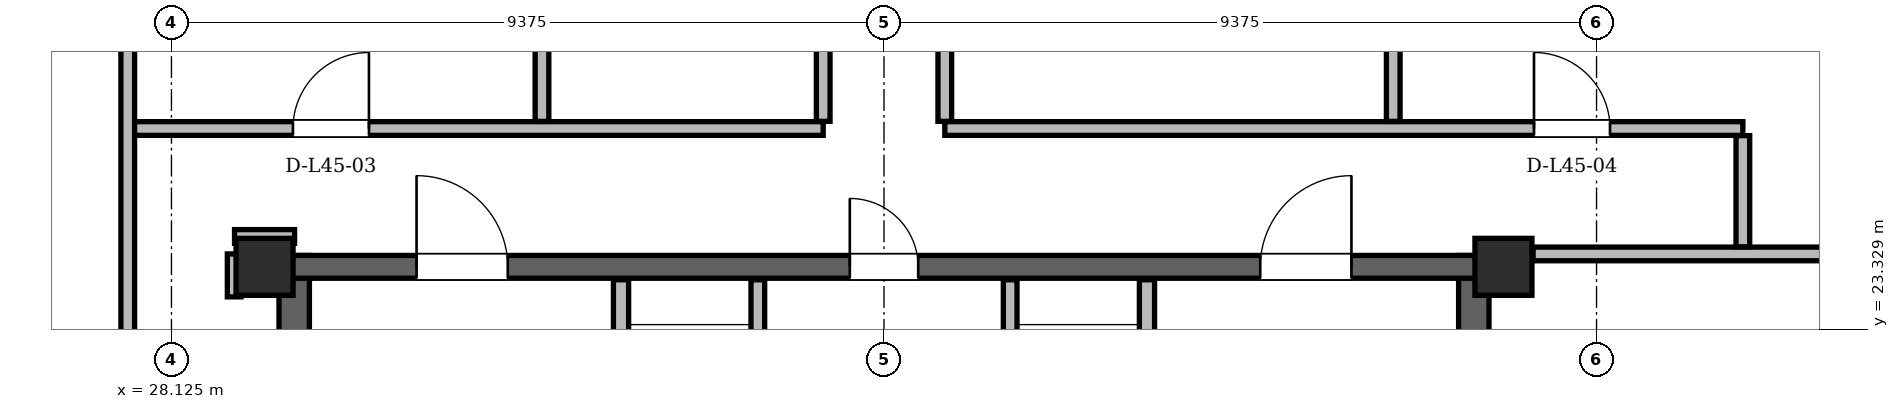
"""IFC4 building model, lengths in metres.
Left out: names, types, materials, properties, quantities, classifications, styles, units other than length and angle.
Written with IfcOpenShell. Run it as: python <this file> out.ifc"""

import sys

from ifc_helpers import new_model, si_unit, direction, frame, frame_2d, origin, origin_2d, place, context, subcontext, project, spatial, rectangle, hollow_rectangle, extrude, element, fill, save


model = new_model("IFC4")
c1 = context("Model", 3, precision=1e-05, world=origin(), true_north=direction((0.0, 1.0)))
c2 = subcontext(c1, "Body", "Model", "MODEL_VIEW")
j1 = project(units=[si_unit("LENGTHUNIT", "METRE"), si_unit("PLANEANGLEUNIT", "RADIAN")], contexts=[c1])
p1 = place(None, origin())
s1 = spatial("IfcSite", under=j1, at=p1, CompositionType="ELEMENT")
p2 = place(p1, origin())
s2 = spatial("IfcBuilding", under=s1, at=p2, CompositionType="ELEMENT")
p3 = place(p2, frame((0.0, 0.0, 171.0)))
s3 = spatial("IfcBuildingStorey", under=s2, at=p3, CompositionType="ELEMENT", Elevation=171.0)
for number, where, z_axis, x_axis in (
    (1, (45.65, 24.15, 0.0), (0.0, 0.0, 1.0), (1.0, 0.0, 0.0)),
    (2, (29.35, 24.15, 0.0), (0.0, 0.0, 1.0), (1.0, 0.0, 0.0)),
):
    element("IfcColumn", number, at=place(p3, frame(where, z_axis=z_axis, x_axis=x_axis)), inside=s3, PredefinedType="COLUMN", context=c2, shape_type="SweptSolid", body=[
        extrude(hollow_rectangle(XDim=0.75, YDim=0.75, WallThickness=0.06, at=origin_2d()), origin(), (0.0, 0.0, 1.0), 3.6),
    ])
for number, where, z_axis, x_axis in (
    (3, (29.74, 11.0, 0.0), (0.0, 0.0, 1.0), (0.0, 1.0, 0.0)),
    (4, (45.26, 11.0, 0.0), (0.0, 0.0, 1.0), (0.0, 1.0, 0.0)),
):
    element("IfcWall", number, at=place(p3, frame(where, z_axis=z_axis, x_axis=x_axis)), inside=s3, PredefinedType="SHEAR", context=c2, shape_type="SweptSolid", body=[
        extrude(rectangle(XDim=13.3, YDim=0.4, at=frame_2d((6.65, 0.0))), origin(), (0.0, 0.0, 1.0), 3.38),
    ])
p4 = place(p3, frame((29.65, 24.15, 0.0), z_axis=(0.0, 0.0, 1.0), x_axis=(1.0, 0.0, 0.0)))
e5 = element("IfcWall", 5, at=p4, inside=s3, PredefinedType="SHEAR", context=c2, shape_type="SweptSolid", body=[
    extrude(rectangle(XDim=15.7, YDim=0.3, at=frame_2d((7.85, 0.0))), origin(), (0.0, 0.0, 1.0), 3.38),
])
p5 = place(p4, frame((1.7, 0.0, 0.0)))
e6 = element("IfcOpeningElement", 6, at=p5, cuts=e5, PredefinedType="OPENING", context=c2, shape_type="SweptSolid", body=[
    extrude(rectangle(XDim=1.2, YDim=2.2, at=frame_2d((0.6, 1.1))), frame((0.0, 0.15, 0.0), z_axis=(0.0, -1.0, 0.0), x_axis=(1.0, 0.0, 0.0)), (0.0, 0.0, 1.0), 0.3),
])
p6 = place(p4, frame((12.8, 0.0, 0.0)))
e7 = element("IfcOpeningElement", 7, at=p6, cuts=e5, PredefinedType="OPENING", context=c2, shape_type="SweptSolid", body=[
    extrude(rectangle(XDim=1.2, YDim=2.2, at=frame_2d((0.6, 1.1))), frame((0.0, 0.15, 0.0), z_axis=(0.0, -1.0, 0.0), x_axis=(1.0, 0.0, 0.0)), (0.0, 0.0, 1.0), 0.3),
])
p7 = place(p4, frame((7.4, 0.0, 0.0)))
e8 = element("IfcOpeningElement", 8, at=p7, cuts=e5, PredefinedType="OPENING", context=c2, shape_type="SweptSolid", body=[
    extrude(rectangle(XDim=0.9, YDim=2.05, at=frame_2d((0.45, 1.025))), frame((0.0, 0.15, 0.0), z_axis=(0.0, -1.0, 0.0), x_axis=(1.0, 0.0, 0.0)), (0.0, 0.0, 1.0), 0.3),
])
p8 = place(p3, frame((59.708, 12.214, 0.0), z_axis=(0.0, 0.0, 1.0), x_axis=(-0.499997229411, 0.866027003379, 0.0)))
e9 = element("IfcWall", 9, at=p8, inside=s3, PredefinedType="SOLIDWALL", context=c2, shape_type="SweptSolid", body=[
    extrude(rectangle(XDim=35.866, YDim=0.29, at=frame_2d((17.933, 0.0))), origin(), (0.0, 0.0, 1.0), 2.6),
])
p9 = place(p8, frame((8.034, 0.0, 0.0)))
e10 = element("IfcOpeningElement", 10, at=p9, cuts=e9, PredefinedType="OPENING", context=c2, shape_type="SweptSolid", body=[
    extrude(rectangle(XDim=1.5, YDim=2.2, at=frame_2d((0.75, 1.1))), frame((0.0, 0.145, 0.0), z_axis=(0.0, -1.0, 0.0), x_axis=(1.0, 0.0, 0.0)), (0.0, 0.0, 1.0), 0.29),
])
p10 = place(p8, frame((27.787, 0.0, 0.0)))
e11 = element("IfcOpeningElement", 11, at=p10, cuts=e9, PredefinedType="OPENING", context=c2, shape_type="SweptSolid", body=[
    extrude(rectangle(XDim=1.5, YDim=2.2, at=frame_2d((0.75, 1.1))), frame((0.0, 0.145, 0.0), z_axis=(0.0, -1.0, 0.0), x_axis=(1.0, 0.0, 0.0)), (0.0, 0.0, 1.0), 0.29),
])
p11 = place(p8, frame((33.023, 0.0, 0.85)))
e12 = element("IfcOpeningElement", 12, at=p11, cuts=e9, PredefinedType="OPENING", context=c2, shape_type="SweptSolid", body=[
    extrude(rectangle(XDim=1.2, YDim=1.48, at=frame_2d((0.6, 0.74))), frame((0.0, 0.145, 0.0), z_axis=(0.0, -1.0, 0.0), x_axis=(1.0, 0.0, 0.0)), (0.0, 0.0, 1.0), 0.29),
])
p12 = place(p8, frame((15.917, 0.0, 0.85)))
e13 = element("IfcOpeningElement", 13, at=p12, cuts=e9, PredefinedType="OPENING", context=c2, shape_type="SweptSolid", body=[
    extrude(rectangle(XDim=1.4, YDim=1.6, at=frame_2d((0.7, 0.8))), frame((0.0, 0.145, 0.0), z_axis=(0.0, -1.0, 0.0), x_axis=(1.0, 0.0, 0.0)), (0.0, 0.0, 1.0), 0.29),
])
p13 = place(p8, frame((21.416, 0.0, 0.85)))
e14 = element("IfcOpeningElement", 14, at=p13, cuts=e9, PredefinedType="OPENING", context=c2, shape_type="SweptSolid", body=[
    extrude(rectangle(XDim=2.5, YDim=1.64, at=frame_2d((1.25, 0.82))), frame((0.0, 0.145, 0.0), z_axis=(0.0, -1.0, 0.0), x_axis=(1.0, 0.0, 0.0)), (0.0, 0.0, 1.0), 0.29),
])
p14 = place(p3, frame((33.226, 43.275, 0.0), z_axis=(0.0, 0.0, 1.0), x_axis=(-0.499997229411, -0.866027003379, 0.0)))
e15 = element("IfcWall", 15, at=p14, inside=s3, PredefinedType="SOLIDWALL", context=c2, shape_type="SweptSolid", body=[
    extrude(rectangle(XDim=35.866, YDim=0.29, at=frame_2d((17.933, 0.0))), origin(), (0.0, 0.0, 1.0), 2.6),
])
p15 = place(p14, frame((8.034, 0.0, 0.0)))
e16 = element("IfcOpeningElement", 16, at=p15, cuts=e15, PredefinedType="OPENING", context=c2, shape_type="SweptSolid", body=[
    extrude(rectangle(XDim=1.5, YDim=2.2, at=frame_2d((0.75, 1.1))), frame((0.0, 0.145, 0.0), z_axis=(0.0, -1.0, 0.0), x_axis=(1.0, 0.0, 0.0)), (0.0, 0.0, 1.0), 0.29),
])
p16 = place(p14, frame((27.787, 0.0, 0.0)))
e17 = element("IfcOpeningElement", 17, at=p16, cuts=e15, PredefinedType="OPENING", context=c2, shape_type="SweptSolid", body=[
    extrude(rectangle(XDim=1.5, YDim=2.2, at=frame_2d((0.75, 1.1))), frame((0.0, 0.145, 0.0), z_axis=(0.0, -1.0, 0.0), x_axis=(1.0, 0.0, 0.0)), (0.0, 0.0, 1.0), 0.29),
])
p17 = place(p14, frame((33.63, 0.0, 0.85)))
e18 = element("IfcOpeningElement", 18, at=p17, cuts=e15, PredefinedType="OPENING", context=c2, shape_type="SweptSolid", body=[
    extrude(rectangle(XDim=1.2, YDim=1.48, at=frame_2d((0.6, 0.74))), frame((0.0, 0.145, 0.0), z_axis=(0.0, -1.0, 0.0), x_axis=(1.0, 0.0, 0.0)), (0.0, 0.0, 1.0), 0.29),
])
p18 = place(p14, frame((18.03, 0.0, 0.85)))
e19 = element("IfcOpeningElement", 19, at=p18, cuts=e15, PredefinedType="OPENING", context=c2, shape_type="SweptSolid", body=[
    extrude(rectangle(XDim=2.6, YDim=1.64, at=frame_2d((1.3, 0.82))), frame((0.0, 0.145, 0.0), z_axis=(0.0, -1.0, 0.0), x_axis=(1.0, 0.0, 0.0)), (0.0, 0.0, 1.0), 0.29),
])
p19 = place(p14, frame((26.121, 0.0, 0.85)))
e20 = element("IfcOpeningElement", 20, at=p19, cuts=e15, PredefinedType="OPENING", context=c2, shape_type="SweptSolid", body=[
    extrude(rectangle(XDim=1.2, YDim=1.48, at=frame_2d((0.6, 0.74))), frame((0.0, 0.145, 0.0), z_axis=(0.0, -1.0, 0.0), x_axis=(1.0, 0.0, 0.0)), (0.0, 0.0, 1.0), 0.29),
])
p20 = place(p14, frame((12.379, 0.0, 0.85)))
e21 = element("IfcOpeningElement", 21, at=p20, cuts=e15, PredefinedType="OPENING", context=c2, shape_type="SweptSolid", body=[
    extrude(rectangle(XDim=1.2, YDim=1.48, at=frame_2d((0.6, 0.74))), frame((0.0, 0.145, 0.0), z_axis=(0.0, -1.0, 0.0), x_axis=(1.0, 0.0, 0.0)), (0.0, 0.0, 1.0), 0.29),
])
p21 = place(p14, frame((14.675, 0.0, 0.85)))
e22 = element("IfcOpeningElement", 22, at=p21, cuts=e15, PredefinedType="OPENING", context=c2, shape_type="SweptSolid", body=[
    extrude(rectangle(XDim=1.8, YDim=1.64, at=frame_2d((0.9, 0.82))), frame((0.0, 0.145, 0.0), z_axis=(0.0, -1.0, 0.0), x_axis=(1.0, 0.0, 0.0)), (0.0, 0.0, 1.0), 0.29),
])
p22 = place(p14, frame((2.162, 0.0, 0.85)))
e23 = element("IfcOpeningElement", 23, at=p22, cuts=e15, PredefinedType="OPENING", context=c2, shape_type="SweptSolid", body=[
    extrude(rectangle(XDim=2.0, YDim=1.64, at=frame_2d((1.0, 0.82))), frame((0.0, 0.145, 0.0), z_axis=(0.0, -1.0, 0.0), x_axis=(1.0, 0.0, 0.0)), (0.0, 0.0, 1.0), 0.29),
])
p23 = place(p3, frame((34.04, 19.48, 0.0), z_axis=(0.0, 0.0, 1.0), x_axis=(0.0, 1.0, 0.0)))
e24 = element("IfcWall", 24, at=p23, inside=s3, PredefinedType="PARTITIONING", context=c2, shape_type="SweptSolid", body=[
    extrude(rectangle(XDim=4.5, YDim=0.2, at=frame_2d((2.25, 0.0))), origin(), (0.0, 0.0, 1.0), 3.38),
])
p24 = place(p23, frame((2.12, 0.0, 0.0)))
e25 = element("IfcOpeningElement", 25, at=p24, cuts=e24, PredefinedType="OPENING", context=c2, shape_type="SweptSolid", body=[
    extrude(rectangle(XDim=1.1, YDim=2.2, at=frame_2d((0.55, 1.1))), frame((0.0, 0.1, 0.0), z_axis=(0.0, -1.0, 0.0), x_axis=(1.0, 0.0, 0.0)), (0.0, 0.0, 1.0), 0.2),
])
p25 = place(p3, frame((35.84, 20.96, 0.0), z_axis=(0.0, 0.0, 1.0), x_axis=(0.0, 1.0, 0.0)))
e26 = element("IfcWall", 26, at=p25, inside=s3, PredefinedType="PARTITIONING", context=c2, shape_type="SweptSolid", body=[
    extrude(rectangle(XDim=3.02, YDim=0.18, at=frame_2d((1.51, 0.0))), origin(), (0.0, 0.0, 1.0), 3.38),
])
p26 = place(p3, frame((40.96, 19.48, 0.0), z_axis=(0.0, 0.0, 1.0), x_axis=(0.0, 1.0, 0.0)))
e27 = element("IfcWall", 27, at=p26, inside=s3, PredefinedType="PARTITIONING", context=c2, shape_type="SweptSolid", body=[
    extrude(rectangle(XDim=4.5, YDim=0.2, at=frame_2d((2.25, 0.0))), origin(), (0.0, 0.0, 1.0), 3.38),
])
p27 = place(p26, frame((2.12, 0.0, 0.0)))
e28 = element("IfcOpeningElement", 28, at=p27, cuts=e27, PredefinedType="OPENING", context=c2, shape_type="SweptSolid", body=[
    extrude(rectangle(XDim=1.1, YDim=2.2, at=frame_2d((0.55, 1.1))), frame((0.0, 0.1, 0.0), z_axis=(0.0, -1.0, 0.0), x_axis=(1.0, 0.0, 0.0)), (0.0, 0.0, 1.0), 0.2),
])
p28 = place(p3, frame((39.16, 20.96, 0.0), z_axis=(0.0, 0.0, 1.0), x_axis=(0.0, 1.0, 0.0)))
e29 = element("IfcWall", 29, at=p28, inside=s3, PredefinedType="PARTITIONING", context=c2, shape_type="SweptSolid", body=[
    extrude(rectangle(XDim=3.02, YDim=0.18, at=frame_2d((1.51, 0.0))), origin(), (0.0, 0.0, 1.0), 3.38),
])
p29 = place(p3, frame((46.04, 24.32, 0.0), z_axis=(0.0, 0.0, 1.0), x_axis=(1.0, 0.0, 0.0)))
e30 = element("IfcWall", 30, at=p29, inside=s3, PredefinedType="PARTITIONING", context=c2, shape_type="SweptSolid", body=[
    extrude(rectangle(XDim=6.506, YDim=0.18, at=frame_2d((3.253, 0.0))), origin(), (0.0, 0.0, 1.0), 3.38),
])
p30 = place(p3, frame((28.955, 24.55, 0.0), z_axis=(0.0, 0.0, 1.0), x_axis=(1.0, 0.0, 0.0)))
e31 = element("IfcWall", 31, at=p30, inside=s3, PredefinedType="PARTITIONING", context=c2, shape_type="SweptSolid", body=[
    extrude(rectangle(XDim=0.79, YDim=0.18, at=frame_2d((0.395, 0.0))), origin(), (0.0, 0.0, 1.0), 2.842),
])
p31 = place(p3, frame((27.55, 25.97, 0.0), z_axis=(0.0, 0.0, 1.0), x_axis=(1.0, 0.0, 0.0)))
e32 = element("IfcWall", 32, at=p31, inside=s3, PredefinedType="PARTITIONING", context=c2, shape_type="SweptSolid", body=[
    extrude(rectangle(XDim=9.15, YDim=0.18, at=frame_2d((4.575, 0.0))), origin(), (0.0, 0.0, 1.0), 2.842),
])
p32 = place(p31, frame((2.173, 0.0, 0.0)))
e33 = element("IfcOpeningElement", 33, at=p32, cuts=e32, PredefinedType="OPENING", context=c2, shape_type="SweptSolid", body=[
    extrude(rectangle(XDim=1.0, YDim=2.18, at=frame_2d((0.5, 1.09))), frame((0.0, 0.09, 0.0), z_axis=(0.0, -1.0, 0.0), x_axis=(1.0, 0.0, 0.0)), (0.0, 0.0, 1.0), 0.18),
])
p33 = place(p3, frame((38.3, 25.97, 0.0), z_axis=(0.0, 0.0, 1.0), x_axis=(1.0, 0.0, 0.0)))
e34 = element("IfcWall", 34, at=p33, inside=s3, PredefinedType="PARTITIONING", context=c2, shape_type="SweptSolid", body=[
    extrude(rectangle(XDim=10.5, YDim=0.18, at=frame_2d((5.25, 0.0))), origin(), (0.0, 0.0, 1.0), 2.842),
])
p34 = place(p33, frame((7.752, 0.0, 0.0)))
e35 = element("IfcOpeningElement", 35, at=p34, cuts=e34, PredefinedType="OPENING", context=c2, shape_type="SweptSolid", body=[
    extrude(rectangle(XDim=1.0, YDim=2.18, at=frame_2d((0.5, 1.09))), frame((0.0, 0.09, 0.0), z_axis=(0.0, -1.0, 0.0), x_axis=(1.0, 0.0, 0.0)), (0.0, 0.0, 1.0), 0.18),
])
p35 = place(p3, frame((27.55, 18.544, 0.0), z_axis=(0.0, 0.0, 1.0), x_axis=(0.0, 1.0, 0.0)))
e36 = element("IfcWall", 36, at=p35, inside=s3, PredefinedType="PARTITIONING", context=c2, shape_type="SweptSolid", body=[
    extrude(rectangle(XDim=14.603, YDim=0.18, at=frame_2d((7.302, 0.0))), origin(), (0.0, 0.0, 1.0), 3.38),
])
p36 = place(p35, frame((2.267, 0.0, 0.0)))
e37 = element("IfcOpeningElement", 37, at=p36, cuts=e36, PredefinedType="OPENING", context=c2, shape_type="SweptSolid", body=[
    extrude(rectangle(XDim=1.0, YDim=2.18, at=frame_2d((0.5, 1.09))), frame((0.0, 0.09, 0.0), z_axis=(0.0, -1.0, 0.0), x_axis=(1.0, 0.0, 0.0)), (0.0, 0.0, 1.0), 0.18),
])
p37 = place(p3, frame((28.95, 23.755, 0.0), z_axis=(0.0, 0.0, 1.0), x_axis=(0.0, 1.0, 0.0)))
e38 = element("IfcWall", 38, at=p37, inside=s3, PredefinedType="PARTITIONING", context=c2, shape_type="SweptSolid", body=[
    extrude(rectangle(XDim=0.565, YDim=0.18, at=frame_2d((0.283, 0.0))), origin(), (0.0, 0.0, 1.0), 3.38),
])
p38 = place(p3, frame((33.0, 26.064, 0.0), z_axis=(0.0, 0.0, 1.0), x_axis=(0.0, 1.0, 0.0)))
e39 = element("IfcWall", 39, at=p38, inside=s3, PredefinedType="PARTITIONING", context=c2, shape_type="SweptSolid", body=[
    extrude(rectangle(XDim=16.522, YDim=0.18, at=frame_2d((8.261, 0.0))), origin(), (0.0, 0.0, 1.0), 2.842),
])
p39 = place(p3, frame((36.7, 26.064, 0.0), z_axis=(0.0, 0.0, 1.0), x_axis=(0.0, 1.0, 0.0)))
e40 = element("IfcWall", 40, at=p39, inside=s3, PredefinedType="PARTITIONING", context=c2, shape_type="SweptSolid", body=[
    extrude(rectangle(XDim=17.062, YDim=0.18, at=frame_2d((8.531, 0.0))), origin(), (0.0, 0.0, 1.0), 3.38),
])
p40 = place(p39, frame((4.902, 0.0, 0.0)))
e41 = element("IfcOpeningElement", 41, at=p40, cuts=e40, PredefinedType="OPENING", context=c2, shape_type="SweptSolid", body=[
    extrude(rectangle(XDim=1.0, YDim=2.18, at=frame_2d((0.5, 1.09))), frame((0.0, 0.09, 0.0), z_axis=(0.0, -1.0, 0.0), x_axis=(1.0, 0.0, 0.0)), (0.0, 0.0, 1.0), 0.18),
])
p41 = place(p3, frame((38.3, 26.064, 0.0), z_axis=(0.0, 0.0, 1.0), x_axis=(0.0, 1.0, 0.0)))
e42 = element("IfcWall", 42, at=p41, inside=s3, PredefinedType="PARTITIONING", context=c2, shape_type="SweptSolid", body=[
    extrude(rectangle(XDim=6.042, YDim=0.18, at=frame_2d((3.021, 0.0))), origin(), (0.0, 0.0, 1.0), 3.38),
])
p42 = place(p41, frame((4.455, 0.0, 0.0)))
e43 = element("IfcOpeningElement", 43, at=p42, cuts=e42, PredefinedType="OPENING", context=c2, shape_type="SweptSolid", body=[
    extrude(rectangle(XDim=1.0, YDim=2.18, at=frame_2d((0.5, 1.09))), frame((0.0, 0.09, 0.0), z_axis=(0.0, -1.0, 0.0), x_axis=(1.0, 0.0, 0.0)), (0.0, 0.0, 1.0), 0.18),
])
p43 = place(p3, frame((44.2, 26.064, 0.0), z_axis=(0.0, 0.0, 1.0), x_axis=(0.0, 1.0, 0.0)))
e44 = element("IfcWall", 44, at=p43, inside=s3, PredefinedType="PARTITIONING", context=c2, shape_type="SweptSolid", body=[
    extrude(rectangle(XDim=12.712, YDim=0.18, at=frame_2d((6.356, 0.0))), origin(), (0.0, 0.0, 1.0), 2.842),
])
p44 = place(p3, frame((48.8, 24.414, 0.0), z_axis=(0.0, 0.0, 1.0), x_axis=(0.0, 1.0, 0.0)))
e45 = element("IfcWall", 45, at=p44, inside=s3, PredefinedType="PARTITIONING", context=c2, shape_type="SweptSolid", body=[
    extrude(rectangle(XDim=1.462, YDim=0.18, at=frame_2d((0.731, 0.0))), origin(), (0.0, 0.0, 1.0), 3.38),
])
p45 = place(p5, origin())
e46 = element("IfcDoor", 46, at=p45, inside=s3, OperationType="SINGLE_SWING_LEFT", PredefinedType="DOOR", context=c2, shape_type="SweptSolid", body=[
    extrude(rectangle(XDim=1.2, YDim=2.2, at=frame_2d((0.6, 1.1))), frame((0.0, 0.025, 0.0), z_axis=(0.0, -1.0, 0.0), x_axis=(1.0, 0.0, 0.0)), (0.0, 0.0, 1.0), 0.05),
])
fill(e6, e46)
p46 = place(p6, origin())
e47 = element("IfcDoor", 47, at=p46, inside=s3, OperationType="SINGLE_SWING_RIGHT", PredefinedType="DOOR", context=c2, shape_type="SweptSolid", body=[
    extrude(rectangle(XDim=1.2, YDim=2.2, at=frame_2d((0.6, 1.1))), frame((0.0, 0.025, 0.0), z_axis=(0.0, -1.0, 0.0), x_axis=(1.0, 0.0, 0.0)), (0.0, 0.0, 1.0), 0.05),
])
fill(e7, e47)
p47 = place(p7, origin())
e48 = element("IfcDoor", 48, at=p47, inside=s3, OperationType="SINGLE_SWING_LEFT", PredefinedType="DOOR", context=c2, shape_type="SweptSolid", body=[
    extrude(rectangle(XDim=0.9, YDim=2.05, at=frame_2d((0.45, 1.025))), frame((0.0, 0.025, 0.0), z_axis=(0.0, -1.0, 0.0), x_axis=(1.0, 0.0, 0.0)), (0.0, 0.0, 1.0), 0.05),
])
fill(e8, e48)
p48 = place(p32, origin())
e49 = element("IfcDoor", 49, at=p48, inside=s3, OperationType="SINGLE_SWING_RIGHT", PredefinedType="DOOR", context=c2, shape_type="SweptSolid", body=[
    extrude(rectangle(XDim=1.0, YDim=2.18, at=frame_2d((0.5, 1.09))), frame((0.0, 0.025, 0.0), z_axis=(0.0, -1.0, 0.0), x_axis=(1.0, 0.0, 0.0)), (0.0, 0.0, 1.0), 0.05),
])
fill(e33, e49)
p49 = place(p34, origin())
e50 = element("IfcDoor", 50, at=p49, inside=s3, OperationType="SINGLE_SWING_LEFT", PredefinedType="DOOR", context=c2, shape_type="SweptSolid", body=[
    extrude(rectangle(XDim=1.0, YDim=2.18, at=frame_2d((0.5, 1.09))), frame((0.0, 0.025, 0.0), z_axis=(0.0, -1.0, 0.0), x_axis=(1.0, 0.0, 0.0)), (0.0, 0.0, 1.0), 0.05),
])
fill(e35, e50)
save(model, sys.argv[1])
